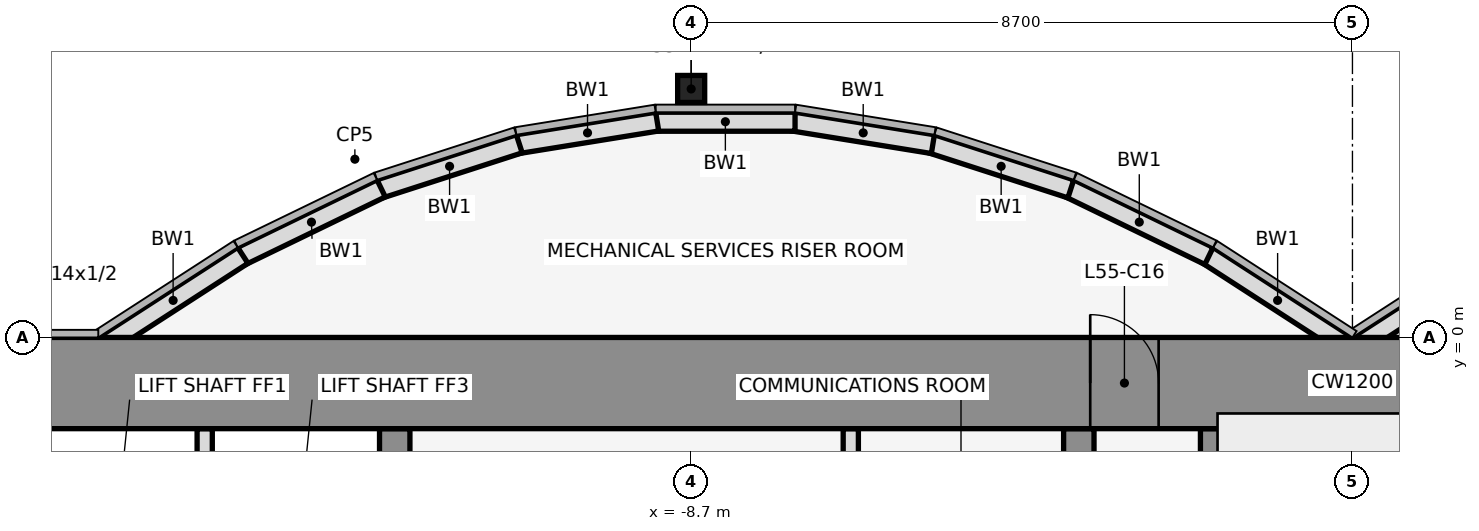
"""IFC4 building model, lengths in metres.
Left out: names, types, materials, properties, quantities, classifications, styles, units other than length and angle.
Written with IfcOpenShell. Run it as: python <this file> out.ifc"""

import sys

from ifc_helpers import new_model, si_unit, direction, frame, frame_2d, origin, origin_2d, place, context, subcontext, project, spatial, rectangle, hollow_rectangle, extrude, element, fill, save


model = new_model("IFC4")
c1 = context("Model", 3, precision=1e-05, world=origin(), true_north=direction((0.0, 1.0)))
c2 = subcontext(c1, "Body", "Model", "MODEL_VIEW")
j1 = project(units=[si_unit("LENGTHUNIT", "METRE"), si_unit("PLANEANGLEUNIT", "RADIAN")], contexts=[c1])
p1 = place(None, origin())
s1 = spatial("IfcSite", under=j1, at=p1, CompositionType="ELEMENT")
p2 = place(p1, origin())
s2 = spatial("IfcBuilding", under=s1, at=p2, CompositionType="ELEMENT")
p3 = place(p2, frame((0.0, 0.0, 245.6)))
s3 = spatial("IfcBuildingStorey", under=s2, at=p3, CompositionType="ELEMENT", Elevation=245.6)
p4 = place(p3, frame((-8.7, 3.269, 0.0), z_axis=(0.0, 0.0, 1.0), x_axis=(1.0, 0.0, 0.0)))
e1 = element("IfcColumn", 1, at=p4, inside=s3, PredefinedType="COLUMN", context=c2, shape_type="SweptSolid", body=[
    extrude(hollow_rectangle(XDim=0.356, YDim=0.356, WallThickness=0.012, at=origin_2d()), origin(), (0.0, 0.0, 1.0), 4.2),
])
for number, where, z_axis, x_axis in (
    (2, (1.901, 1.08, 0.0), (0.0, 0.0, 1.0), (-0.84, -0.543, 0.0)),
    (3, (-0.068, -0.105, 0.0), (0.0, 0.0, 1.0), (-0.84, 0.543, 0.0)),
):
    element("IfcWall", number, at=place(p3, frame(where, z_axis=z_axis, x_axis=x_axis)), inside=s3, PredefinedType="STANDARD", context=c2, shape_type="SweptSolid", body=[
        extrude(rectangle(XDim=2.183, YDim=0.25, at=frame_2d((1.091, 0.0))), origin(), (0.0, 0.0, 1.0), 4.05),
    ])
p5 = place(p3, frame((-1.888, 1.073, 0.0), z_axis=(0.0, 0.0, 1.0), x_axis=(-0.89982408427, 0.436252928206, 0.0)))
e4 = element("IfcWall", 4, at=p5, inside=s3, PredefinedType="STANDARD", context=c2, shape_type="SweptSolid", body=[
    extrude(rectangle(XDim=2.038, YDim=0.25, at=frame_2d((1.019, 0.0))), origin(), (0.0, 0.0, 1.0), 4.05),
])
p6 = place(p3, frame((-3.705, 1.955, 0.0), z_axis=(0.0, 0.0, 1.0), x_axis=(-0.951495806175, 0.307661714928, 0.0)))
e5 = element("IfcWall", 5, at=p6, inside=s3, PredefinedType="STANDARD", context=c2, shape_type="SweptSolid", body=[
    extrude(rectangle(XDim=1.927, YDim=0.25, at=frame_2d((0.963, 0.0))), origin(), (0.0, 0.0, 1.0), 4.05),
])
p7 = place(p3, frame((-5.52, 2.543, 0.0), z_axis=(0.0, 0.0, 1.0), x_axis=(-0.987181718931, 0.159600293885, 0.0)))
e6 = element("IfcWall", 6, at=p7, inside=s3, PredefinedType="STANDARD", context=c2, shape_type="SweptSolid", body=[
    extrude(rectangle(XDim=1.857, YDim=0.25, at=frame_2d((0.929, 0.0))), origin(), (0.0, 0.0, 1.0), 4.05),
])
p8 = place(p3, frame((-7.333, 2.838, 0.0), z_axis=(0.0, 0.0, 1.0), x_axis=(-1.0, 0.0, 0.0)))
e7 = element("IfcWall", 7, at=p8, inside=s3, PredefinedType="STANDARD", context=c2, shape_type="SweptSolid", body=[
    extrude(rectangle(XDim=1.833, YDim=0.25, at=frame_2d((0.917, 0.0))), origin(), (0.0, 0.0, 1.0), 4.05),
])
p9 = place(p3, frame((-9.147, 2.84, 0.0), z_axis=(0.0, 0.0, 1.0), x_axis=(-0.987181718931, -0.159600293885, 0.0)))
e8 = element("IfcWall", 8, at=p9, inside=s3, PredefinedType="STANDARD", context=c2, shape_type="SweptSolid", body=[
    extrude(rectangle(XDim=1.857, YDim=0.25, at=frame_2d((0.929, 0.0))), origin(), (0.0, 0.0, 1.0), 4.05),
])
p10 = place(p3, frame((-10.962, 2.548, 0.0), z_axis=(0.0, 0.0, 1.0), x_axis=(-0.951495806175, -0.307661714928, 0.0)))
e9 = element("IfcWall", 9, at=p10, inside=s3, PredefinedType="STANDARD", context=c2, shape_type="SweptSolid", body=[
    extrude(rectangle(XDim=1.927, YDim=0.25, at=frame_2d((0.963, 0.0))), origin(), (0.0, 0.0, 1.0), 4.05),
])
p11 = place(p3, frame((-12.779, 1.962, 0.0), z_axis=(0.0, 0.0, 1.0), x_axis=(-0.89982408427, -0.436252928206, 0.0)))
e10 = element("IfcWall", 10, at=p11, inside=s3, PredefinedType="STANDARD", context=c2, shape_type="SweptSolid", body=[
    extrude(rectangle(XDim=2.038, YDim=0.25, at=frame_2d((1.019, 0.0))), origin(), (0.0, 0.0, 1.0), 4.05),
])
p12 = place(p3, frame((-14.599, 1.08, 0.0), z_axis=(0.0, 0.0, 1.0), x_axis=(-0.83981312244, -0.542875602121, 0.0)))
e11 = element("IfcWall", 11, at=p12, inside=s3, PredefinedType="STANDARD", context=c2, shape_type="SweptSolid", body=[
    extrude(rectangle(XDim=2.183, YDim=0.25, at=frame_2d((1.091, 0.0))), origin(), (0.0, 0.0, 1.0), 4.05),
])
p13 = place(p3, frame((-15.1, -4.6, 0.0), z_axis=(0.0, 0.0, 1.0), x_axis=(0.0, 1.0, 0.0)))
e12 = element("IfcWall", 12, at=p13, inside=s3, PredefinedType="PARTITIONING", context=c2, shape_type="SweptSolid", body=[
    extrude(rectangle(XDim=3.4, YDim=0.2, at=frame_2d((1.7, 0.0))), origin(), (0.0, 0.0, 1.0), 3.039),
])
p14 = place(p3, frame((-12.6, -11.8, 0.0), z_axis=(0.0, 0.0, 1.0), x_axis=(0.0, 1.0, 0.0)))
e13 = element("IfcWall", 13, at=p14, inside=s3, PredefinedType="SHEAR", context=c2, shape_type="SweptSolid", body=[
    extrude(rectangle(XDim=10.6, YDim=0.4, at=frame_2d((5.3, 0.0))), origin(), (0.0, 0.0, 1.0), 4.2),
])
p15 = place(p14, frame((4.75, 0.0, 0.0)))
e14 = element("IfcOpeningElement", 14, at=p15, cuts=e13, PredefinedType="OPENING", context=c2, shape_type="SweptSolid", body=[
    extrude(rectangle(XDim=1.1, YDim=2.1, at=frame_2d((0.55, 1.05))), frame((0.0, 0.212, 0.0), z_axis=(0.0, -1.0, 0.0), x_axis=(1.0, 0.0, 0.0)), (0.0, 0.0, 1.0), 0.424),
])
p16 = place(p3, frame((-6.6, -4.6, 0.0), z_axis=(0.0, 0.0, 1.0), x_axis=(0.0, 1.0, 0.0)))
e15 = element("IfcWall", 15, at=p16, inside=s3, PredefinedType="PARTITIONING", context=c2, shape_type="SweptSolid", body=[
    extrude(rectangle(XDim=3.4, YDim=0.2, at=frame_2d((1.7, 0.0))), origin(), (0.0, 0.0, 1.0), 3.039),
])
p17 = place(p3, frame((-3.6, -11.8, 0.0), z_axis=(0.0, 0.0, 1.0), x_axis=(0.0, 1.0, 0.0)))
e16 = element("IfcWall", 16, at=p17, inside=s3, PredefinedType="SHEAR", context=c2, shape_type="SweptSolid", body=[
    extrude(rectangle(XDim=10.6, YDim=0.4, at=frame_2d((5.3, 0.0))), origin(), (0.0, 0.0, 1.0), 4.2),
])
p18 = place(p17, frame((4.85, 0.0, 0.0)))
e17 = element("IfcOpeningElement", 17, at=p18, cuts=e16, PredefinedType="OPENING", context=c2, shape_type="SweptSolid", body=[
    extrude(rectangle(XDim=0.9, YDim=2.1, at=frame_2d((0.45, 1.05))), frame((0.0, 0.212, 0.0), z_axis=(0.0, -1.0, 0.0), x_axis=(1.0, 0.0, 0.0)), (0.0, 0.0, 1.0), 0.424),
])
p19 = place(p3, frame((-1.8, -11.8, 0.0), z_axis=(0.0, 0.0, 1.0), x_axis=(0.0, 1.0, 0.0)))
e18 = element("IfcWall", 18, at=p19, inside=s3, PredefinedType="SHEAR", context=c2, shape_type="SweptSolid", body=[
    extrude(rectangle(XDim=10.6, YDim=0.4, at=frame_2d((5.3, 0.0))), origin(), (0.0, 0.0, 1.0), 4.2),
])
p20 = place(p3, frame((-22.0, -0.6, 0.0), z_axis=(0.0, 0.0, 1.0), x_axis=(1.0, 0.0, 0.0)))
e19 = element("IfcWall", 19, at=p20, inside=s3, PredefinedType="SHEAR", context=c2, shape_type="SweptSolid", body=[
    extrude(rectangle(XDim=44.0, YDim=1.2, at=frame_2d((22.0, 0.0))), origin(), (0.0, 0.0, 1.0), 4.2),
])
p21 = place(p20, frame((18.55, 0.0, 0.0)))
e20 = element("IfcOpeningElement", 20, at=p21, cuts=e19, PredefinedType="OPENING", context=c2, shape_type="SweptSolid", body=[
    extrude(rectangle(XDim=0.9, YDim=2.1, at=frame_2d((0.45, 1.05))), frame((0.0, 0.612, 0.0), z_axis=(0.0, -1.0, 0.0), x_axis=(1.0, 0.0, 0.0)), (0.0, 0.0, 1.0), 1.224),
])
p22 = place(p20, frame((24.55, 0.0, 0.0)))
e21 = element("IfcOpeningElement", 21, at=p22, cuts=e19, PredefinedType="OPENING", context=c2, shape_type="SweptSolid", body=[
    extrude(rectangle(XDim=0.9, YDim=2.1, at=frame_2d((0.45, 1.05))), frame((0.0, 0.612, 0.0), z_axis=(0.0, -1.0, 0.0), x_axis=(1.0, 0.0, 0.0)), (0.0, 0.0, 1.0), 1.224),
])
p23 = place(p21, origin())
e22 = element("IfcDoor", 22, at=p23, inside=s3, OperationType="SINGLE_SWING_LEFT", PredefinedType="DOOR", context=c2, shape_type="SweptSolid", body=[
    extrude(rectangle(XDim=0.9, YDim=2.1, at=frame_2d((0.45, 1.05))), frame((0.0, 0.025, 0.0), z_axis=(0.0, -1.0, 0.0), x_axis=(1.0, 0.0, 0.0)), (0.0, 0.0, 1.0), 0.05),
])
fill(e20, e22)
save(model, sys.argv[1])
